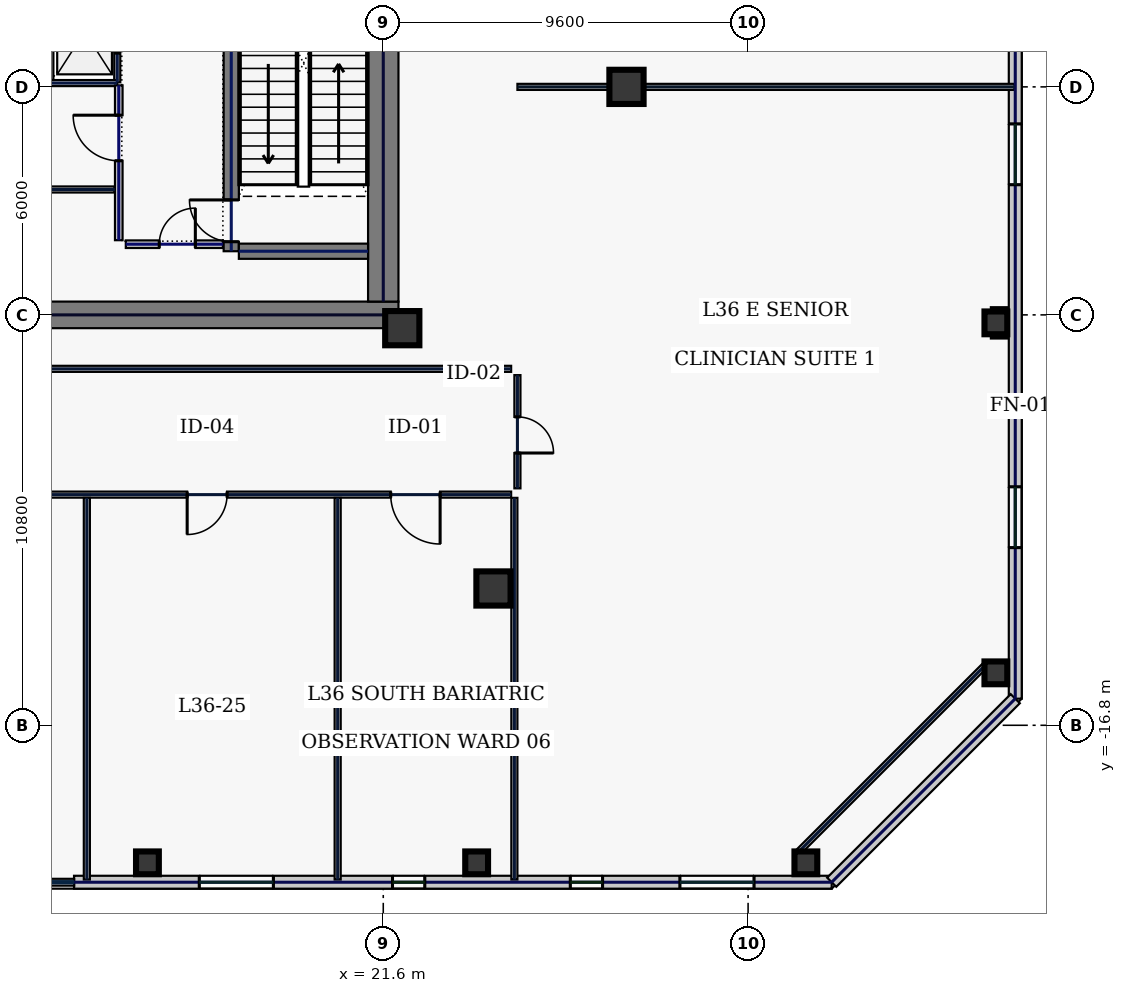
"""IFC4 building model, lengths in metres.
Left out: names, types, materials, properties, quantities, classifications, styles, units other than length and angle.
Written with IfcOpenShell. Run it as: python <this file> out.ifc"""

import sys

from ifc_helpers import new_model, si_unit, direction, frame, frame_2d, origin, origin_2d, place, context, subcontext, project, spatial, rectangle, hollow_rectangle, extrude, element, fill, save


model = new_model("IFC4")
c1 = context("Model", 3, precision=1e-05, world=origin(), true_north=direction((0.0, 1.0)))
c2 = subcontext(c1, "Body", "Model", "MODEL_VIEW")
j1 = project(units=[si_unit("LENGTHUNIT", "METRE"), si_unit("PLANEANGLEUNIT", "RADIAN")], contexts=[c1])
p1 = place(None, origin())
s1 = spatial("IfcSite", under=j1, at=p1, CompositionType="ELEMENT")
p2 = place(p1, origin())
s2 = spatial("IfcBuilding", under=s1, at=p2, CompositionType="ELEMENT")
p3 = place(p2, frame((0.0, 0.0, 160.2)))
s3 = spatial("IfcBuildingStorey", under=s2, at=p3, CompositionType="ELEMENT", Elevation=160.2)
p4 = place(p3, frame((10.45, -6.0, 0.0), z_axis=(0.0, 0.0, 1.0), x_axis=(1.0, 0.0, 0.0)))
e1 = element("IfcWall", 1, at=p4, inside=s3, PredefinedType="SHEAR", context=c2, shape_type="SweptSolid", body=[
    extrude(rectangle(XDim=11.55, YDim=0.7, at=frame_2d((5.775, 0.0))), origin(), (0.0, 0.0, 1.0), 3.74),
])
p5 = place(p3, frame((21.6, -5.65, 0.0), z_axis=(0.0, 0.0, 1.0), x_axis=(0.0, 1.0, 0.0)))
e2 = element("IfcWall", 2, at=p5, inside=s3, PredefinedType="SHEAR", context=c2, shape_type="SweptSolid", body=[
    extrude(rectangle(XDim=11.3, YDim=0.8, at=frame_2d((5.65, 0.0))), origin(), (0.0, 0.0, 1.0), 3.74),
])
p6 = place(p3, frame((17.6, -4.325, 0.0), z_axis=(0.0, 0.0, 1.0), x_axis=(0.0, 1.0, 0.0)))
e3 = element("IfcWall", 3, at=p6, inside=s3, PredefinedType="SHEAR", context=c2, shape_type="SweptSolid", body=[
    extrude(rectangle(XDim=8.65, YDim=0.4, at=frame_2d((4.325, 0.0))), origin(), (0.0, 0.0, 1.0), 3.74),
])
p7 = place(p6, frame((0.25, 0.0, 0.0)))
e4 = element("IfcOpeningElement", 4, at=p7, cuts=e3, PredefinedType="OPENING", context=c2, shape_type="SweptSolid", body=[
    extrude(rectangle(XDim=1.1, YDim=2.2, at=frame_2d((0.55, 1.1))), frame((0.0, 0.21, 0.0), z_axis=(0.0, -1.0, 0.0), x_axis=(1.0, 0.0, 0.0)), (0.0, 0.0, 1.0), 0.42),
])
p8 = place(p3, frame((17.8, -4.325, 0.0), z_axis=(0.0, 0.0, 1.0), x_axis=(1.0, 0.0, 0.0)))
e5 = element("IfcWall", 5, at=p8, inside=s3, PredefinedType="SHEAR", context=c2, shape_type="SweptSolid", body=[
    extrude(rectangle(XDim=3.4, YDim=0.4, at=frame_2d((1.7, 0.0))), origin(), (0.0, 0.0, 1.0), 3.74),
])
for number, where, z_axis, x_axis in (
    (6, (22.1, -6.35, 0.0), (0.0, 0.0, 1.0), (1.0, 0.0, 0.0)),
    (7, (24.5, -13.2, 0.0), (0.0, 0.0, 1.0), (1.0, 0.0, 0.0)),
    (8, (28.0, 0.0, 0.0), (0.0, 0.0, 1.0), (1.0, 0.0, 0.0)),
):
    element("IfcColumn", number, at=place(p3, frame(where, z_axis=z_axis, x_axis=x_axis)), inside=s3, PredefinedType="COLUMN", context=c2, shape_type="SweptSolid", body=[
        extrude(hollow_rectangle(XDim=0.9, YDim=0.9, WallThickness=0.04, at=origin_2d()), origin(), (0.0, 0.0, 1.0), 3.74),
    ])
for number, where, z_axis, x_axis in (
    (9, (15.394, -20.42, 0.0), (0.0, 0.0, 1.0), (1.0, 0.0, 0.0)),
    (10, (24.057, -20.42, 0.0), (0.0, 0.0, 1.0), (1.0, 0.0, 0.0)),
    (11, (32.72, -20.42, 0.0), (0.0, 0.0, 1.0), (1.0, 0.0, 0.0)),
    (12, (37.72, -15.42, 0.0), (0.0, 0.0, 1.0), (1.0, 0.0, 0.0)),
    (13, (37.72, -6.21, 0.0), (0.0, 0.0, 1.0), (1.0, 0.0, 0.0)),
):
    element("IfcColumn", number, at=place(p3, frame(where, z_axis=z_axis, x_axis=x_axis)), inside=s3, PredefinedType="COLUMN", context=c2, shape_type="SweptSolid", body=[
        extrude(hollow_rectangle(XDim=0.6, YDim=0.6, WallThickness=0.028, at=origin_2d()), origin(), (0.0, 0.0, 1.0), 3.74),
    ])
p9 = place(p3, frame((13.463, -20.93, 0.0), z_axis=(0.0, 0.0, 1.0), x_axis=(1.0, 0.0, 0.0)))
e14 = element("IfcWall", 14, at=p9, inside=s3, PredefinedType="STANDARD", context=c2, shape_type="SweptSolid", body=[
    extrude(rectangle(XDim=19.937, YDim=0.34, at=frame_2d((9.969, 0.0))), origin(), (0.0, 0.0, 1.0), 3.74),
])
p10 = place(p9, frame((3.295, 0.0, 0.8)))
e15 = element("IfcOpeningElement", 15, at=p10, cuts=e14, PredefinedType="OPENING", context=c2, shape_type="SweptSolid", body=[
    extrude(rectangle(XDim=1.95, YDim=2.1, at=frame_2d((0.975, 1.05))), frame((0.0, 0.18, 0.0), z_axis=(0.0, -1.0, 0.0), x_axis=(1.0, 0.0, 0.0)), (0.0, 0.0, 1.0), 0.36),
])
p11 = place(p9, frame((8.38, 0.0, 0.8)))
e16 = element("IfcOpeningElement", 16, at=p11, cuts=e14, PredefinedType="OPENING", context=c2, shape_type="SweptSolid", body=[
    extrude(rectangle(XDim=0.85, YDim=1.85, at=frame_2d((0.425, 0.925))), frame((0.0, 0.18, 0.0), z_axis=(0.0, -1.0, 0.0), x_axis=(1.0, 0.0, 0.0)), (0.0, 0.0, 1.0), 0.36),
])
p12 = place(p9, frame((13.058, 0.0, 0.8)))
e17 = element("IfcOpeningElement", 17, at=p12, cuts=e14, PredefinedType="OPENING", context=c2, shape_type="SweptSolid", body=[
    extrude(rectangle(XDim=0.85, YDim=1.85, at=frame_2d((0.425, 0.925))), frame((0.0, 0.18, 0.0), z_axis=(0.0, -1.0, 0.0), x_axis=(1.0, 0.0, 0.0)), (0.0, 0.0, 1.0), 0.36),
])
p13 = place(p9, frame((15.943, 0.0, 0.8)))
e18 = element("IfcOpeningElement", 18, at=p13, cuts=e14, PredefinedType="OPENING", context=c2, shape_type="SweptSolid", body=[
    extrude(rectangle(XDim=1.95, YDim=2.1, at=frame_2d((0.975, 1.05))), frame((0.0, 0.18, 0.0), z_axis=(0.0, -1.0, 0.0), x_axis=(1.0, 0.0, 0.0)), (0.0, 0.0, 1.0), 0.36),
])
p14 = place(p3, frame((38.23, -16.1, 0.0), z_axis=(0.0, 0.0, 1.0), x_axis=(0.0, 1.0, 0.0)))
e19 = element("IfcWall", 19, at=p14, inside=s3, PredefinedType="STANDARD", context=c2, shape_type="SweptSolid", body=[
    extrude(rectangle(XDim=38.2, YDim=0.34, at=frame_2d((19.1, 0.0))), origin(), (0.0, 0.0, 1.0), 3.74),
])
p15 = place(p14, frame((3.975, 0.0, 0.58)))
e20 = element("IfcOpeningElement", 20, at=p15, cuts=e19, PredefinedType="OPENING", context=c2, shape_type="SweptSolid", body=[
    extrude(rectangle(XDim=1.6, YDim=2.3, at=frame_2d((0.8, 1.15))), frame((0.0, 0.18, 0.0), z_axis=(0.0, -1.0, 0.0), x_axis=(1.0, 0.0, 0.0)), (0.0, 0.0, 1.0), 0.36),
])
p16 = place(p14, frame((13.525, 0.0, 0.58)))
e21 = element("IfcOpeningElement", 21, at=p16, cuts=e19, PredefinedType="OPENING", context=c2, shape_type="SweptSolid", body=[
    extrude(rectangle(XDim=1.6, YDim=2.3, at=frame_2d((0.8, 1.15))), frame((0.0, 0.18, 0.0), z_axis=(0.0, -1.0, 0.0), x_axis=(1.0, 0.0, 0.0)), (0.0, 0.0, 1.0), 0.36),
])
p17 = place(p14, frame((23.075, 0.0, 0.58)))
e22 = element("IfcOpeningElement", 22, at=p17, cuts=e19, PredefinedType="OPENING", context=c2, shape_type="SweptSolid", body=[
    extrude(rectangle(XDim=1.6, YDim=2.3, at=frame_2d((0.8, 1.15))), frame((0.0, 0.18, 0.0), z_axis=(0.0, -1.0, 0.0), x_axis=(1.0, 0.0, 0.0)), (0.0, 0.0, 1.0), 0.36),
])
p18 = place(p14, frame((32.625, 0.0, 0.58)))
e23 = element("IfcOpeningElement", 23, at=p18, cuts=e19, PredefinedType="OPENING", context=c2, shape_type="SweptSolid", body=[
    extrude(rectangle(XDim=1.6, YDim=2.3, at=frame_2d((0.8, 1.15))), frame((0.0, 0.18, 0.0), z_axis=(0.0, -1.0, 0.0), x_axis=(1.0, 0.0, 0.0)), (0.0, 0.0, 1.0), 0.36),
])
p19 = place(p3, frame((33.4, -20.93, 0.0), z_axis=(0.0, 0.0, 1.0), x_axis=(0.707124652085, 0.707088909836, 0.0)))
e24 = element("IfcWall", 24, at=p19, inside=s3, PredefinedType="STANDARD", context=c2, shape_type="SweptSolid", body=[
    extrude(rectangle(XDim=6.831, YDim=0.34, at=frame_2d((3.415, 0.0))), origin(), (0.0, 0.0, 1.0), 3.74),
])
p20 = place(p3, frame((14.6, 0.12, 0.0), z_axis=(0.0, 0.0, 1.0), x_axis=(0.0, 1.0, 0.0)))
e25 = element("IfcWall", 25, at=p20, inside=s3, PredefinedType="PARTITIONING", context=c2, shape_type="SweptSolid", body=[
    extrude(rectangle(XDim=2.74, YDim=0.16, at=frame_2d((1.37, 0.0))), origin(), (0.0, 0.0, 1.0), 3.74),
])
p21 = place(p20, frame((0.77, 0.0, 0.0)))
e26 = element("IfcOpeningElement", 26, at=p21, cuts=e25, PredefinedType="OPENING", context=c2, shape_type="SweptSolid", body=[
    extrude(rectangle(XDim=1.2, YDim=2.2, at=frame_2d((0.6, 1.1))), frame((0.0, 0.09, 0.0), z_axis=(0.0, -1.0, 0.0), x_axis=(1.0, 0.0, 0.0)), (0.0, 0.0, 1.0), 0.18),
])
p22 = place(p3, frame((12.84, 0.1, 0.0), z_axis=(0.0, 0.0, 1.0), x_axis=(1.0, 0.0, 0.0)))
e27 = element("IfcWall", 27, at=p22, inside=s3, PredefinedType="PARTITIONING", context=c2, shape_type="SweptSolid", body=[
    extrude(rectangle(XDim=1.76, YDim=0.16, at=frame_2d((0.88, 0.0))), origin(), (0.0, 0.0, 1.0), 3.74),
])
p23 = place(p3, frame((12.84, 0.18, 0.0), z_axis=(0.0, 0.0, 1.0), x_axis=(0.0, 1.0, 0.0)))
e28 = element("IfcWall", 28, at=p23, inside=s3, PredefinedType="PARTITIONING", context=c2, shape_type="SweptSolid", body=[
    extrude(rectangle(XDim=2.62, YDim=0.16, at=frame_2d((1.31, 0.0))), origin(), (0.0, 0.0, 1.0), 3.74),
])
p24 = place(p3, frame((14.825, -4.14, 0.0), z_axis=(0.0, 0.0, 1.0), x_axis=(1.0, 0.0, 0.0)))
e29 = element("IfcWall", 29, at=p24, inside=s3, PredefinedType="SOLIDWALL", context=c2, shape_type="SweptSolid", body=[
    extrude(rectangle(XDim=2.555, YDim=0.2, at=frame_2d((1.277, 0.0))), origin(), (0.0, 0.0, 1.0), 3.74),
])
p25 = place(p24, frame((0.88, 0.0, 0.0)))
e30 = element("IfcOpeningElement", 30, at=p25, cuts=e29, PredefinedType="OPENING", context=c2, shape_type="SweptSolid", body=[
    extrude(rectangle(XDim=0.95, YDim=2.2, at=frame_2d((0.475, 1.1))), frame((0.0, 0.11, 0.0), z_axis=(0.0, -1.0, 0.0), x_axis=(1.0, 0.0, 0.0)), (0.0, 0.0, 1.0), 0.22),
])
p26 = place(p3, frame((12.775, -2.7, 0.0), z_axis=(0.0, 0.0, 1.0), x_axis=(1.0, 0.0, 0.0)))
e31 = element("IfcWall", 31, at=p26, inside=s3, PredefinedType="PARTITIONING", context=c2, shape_type="SweptSolid", body=[
    extrude(rectangle(XDim=1.76, YDim=0.16, at=frame_2d((0.88, 0.0))), origin(), (0.0, 0.0, 1.0), 3.74),
])
p27 = place(p3, frame((14.64, -4.035, 0.0), z_axis=(0.0, 0.0, 1.0), x_axis=(0.0, 1.0, 0.0)))
e32 = element("IfcWall", 32, at=p27, inside=s3, PredefinedType="SOLIDWALL", context=c2, shape_type="SweptSolid", body=[
    extrude(rectangle(XDim=4.075, YDim=0.2, at=frame_2d((2.038, 0.0))), origin(), (0.0, 0.0, 1.0), 3.74),
])
p28 = place(p27, frame((2.09, 0.0, 0.0)))
e33 = element("IfcOpeningElement", 33, at=p28, cuts=e32, PredefinedType="OPENING", context=c2, shape_type="SweptSolid", body=[
    extrude(rectangle(XDim=1.2, YDim=2.2, at=frame_2d((0.6, 1.1))), frame((0.0, 0.11, 0.0), z_axis=(0.0, -1.0, 0.0), x_axis=(1.0, 0.0, 0.0)), (0.0, 0.0, 1.0), 0.22),
])
p29 = place(p3, frame((32.479, -20.18, 0.0), z_axis=(0.0, 0.0, 1.0), x_axis=(0.707106781187, 0.707106781187, 0.0)))
e34 = element("IfcWall", 34, at=p29, inside=s3, PredefinedType="PARTITIONING", context=c2, shape_type="SweptSolid", body=[
    extrude(rectangle(XDim=7.071, YDim=0.16, at=frame_2d((3.536, 0.0))), origin(), (0.0, 0.0, 1.0), 3.74),
])
p30 = place(p3, frame((10.715, -7.42, 0.0), z_axis=(0.0, 0.0, 1.0), x_axis=(1.0, 0.0, 0.0)))
e35 = element("IfcWall", 35, at=p30, inside=s3, PredefinedType="PARTITIONING", context=c2, shape_type="SweptSolid", body=[
    extrude(rectangle(XDim=14.25, YDim=0.16, at=frame_2d((7.125, 0.0))), origin(), (0.0, 0.0, 1.0), 3.74),
])
p31 = place(p3, frame((25.13, -7.585, 0.0), z_axis=(0.0, 0.0, 1.0), x_axis=(0.0, -1.0, 0.0)))
e36 = element("IfcWall", 36, at=p31, inside=s3, PredefinedType="PARTITIONING", context=c2, shape_type="SweptSolid", body=[
    extrude(rectangle(XDim=2.98, YDim=0.16, at=frame_2d((1.49, 0.0))), origin(), (0.0, 0.0, 1.0), 3.74),
])
p32 = place(p31, frame((1.1, 0.0, 0.0)))
e37 = element("IfcOpeningElement", 37, at=p32, cuts=e36, PredefinedType="OPENING", context=c2, shape_type="SweptSolid", body=[
    extrude(rectangle(XDim=0.95, YDim=2.2, at=frame_2d((0.475, 1.1))), frame((0.0, 0.09, 0.0), z_axis=(0.0, -1.0, 0.0), x_axis=(1.0, 0.0, 0.0)), (0.0, 0.0, 1.0), 0.18),
])
p33 = place(p3, frame((24.965, -10.73, 0.0), z_axis=(0.0, 0.0, 1.0), x_axis=(-1.0, 0.0, 0.0)))
e38 = element("IfcWall", 38, at=p33, inside=s3, PredefinedType="PARTITIONING", context=c2, shape_type="SweptSolid", body=[
    extrude(rectangle(XDim=49.93, YDim=0.16, at=frame_2d((24.965, 0.0))), origin(), (0.0, 0.0, 1.0), 3.74),
])
p34 = place(p33, frame((46.931, 0.0, 0.0)))
e39 = element("IfcOpeningElement", 39, at=p34, cuts=e38, PredefinedType="OPENING", context=c2, shape_type="SweptSolid", body=[
    extrude(rectangle(XDim=1.3, YDim=2.2, at=frame_2d((0.65, 1.1))), frame((0.0, 0.09, 0.0), z_axis=(0.0, -1.0, 0.0), x_axis=(1.0, 0.0, 0.0)), (0.0, 0.0, 1.0), 0.18),
])
p35 = place(p33, frame((40.363, 0.0, 0.0)))
e40 = element("IfcOpeningElement", 40, at=p35, cuts=e38, PredefinedType="OPENING", context=c2, shape_type="SweptSolid", body=[
    extrude(rectangle(XDim=1.3, YDim=2.2, at=frame_2d((0.65, 1.1))), frame((0.0, 0.09, 0.0), z_axis=(0.0, -1.0, 0.0), x_axis=(1.0, 0.0, 0.0)), (0.0, 0.0, 1.0), 0.18),
])
p36 = place(p33, frame((32.113, 0.0, 0.0)))
e41 = element("IfcOpeningElement", 41, at=p36, cuts=e38, PredefinedType="OPENING", context=c2, shape_type="SweptSolid", body=[
    extrude(rectangle(XDim=0.95, YDim=2.2, at=frame_2d((0.475, 1.1))), frame((0.0, 0.09, 0.0), z_axis=(0.0, -1.0, 0.0), x_axis=(1.0, 0.0, 0.0)), (0.0, 0.0, 1.0), 0.18),
])
p37 = place(p33, frame((24.55, 0.0, 0.0)))
e42 = element("IfcOpeningElement", 42, at=p37, cuts=e38, PredefinedType="OPENING", context=c2, shape_type="SweptSolid", body=[
    extrude(rectangle(XDim=0.95, YDim=2.2, at=frame_2d((0.475, 1.1))), frame((0.0, 0.09, 0.0), z_axis=(0.0, -1.0, 0.0), x_axis=(1.0, 0.0, 0.0)), (0.0, 0.0, 1.0), 0.18),
])
p38 = place(p33, frame((15.875, 0.0, 0.0)))
e43 = element("IfcOpeningElement", 43, at=p38, cuts=e38, PredefinedType="OPENING", context=c2, shape_type="SweptSolid", body=[
    extrude(rectangle(XDim=0.95, YDim=2.2, at=frame_2d((0.475, 1.1))), frame((0.0, 0.09, 0.0), z_axis=(0.0, -1.0, 0.0), x_axis=(1.0, 0.0, 0.0)), (0.0, 0.0, 1.0), 0.18),
])
p39 = place(p33, frame((7.475, 0.0, 0.0)))
e44 = element("IfcOpeningElement", 44, at=p39, cuts=e38, PredefinedType="OPENING", context=c2, shape_type="SweptSolid", body=[
    extrude(rectangle(XDim=1.05, YDim=2.2, at=frame_2d((0.525, 1.1))), frame((0.0, 0.09, 0.0), z_axis=(0.0, -1.0, 0.0), x_axis=(1.0, 0.0, 0.0)), (0.0, 0.0, 1.0), 0.18),
])
p40 = place(p33, frame((1.869, 0.0, 0.0)))
e45 = element("IfcOpeningElement", 45, at=p40, cuts=e38, PredefinedType="OPENING", context=c2, shape_type="SweptSolid", body=[
    extrude(rectangle(XDim=1.3, YDim=2.2, at=frame_2d((0.65, 1.1))), frame((0.0, 0.09, 0.0), z_axis=(0.0, -1.0, 0.0), x_axis=(1.0, 0.0, 0.0)), (0.0, 0.0, 1.0), 0.18),
])
for number, where, z_axis, x_axis in (
    (46, (25.05, -20.86, 0.0), (0.0, 0.0, 1.0), (0.0, 1.0, 0.0)),
    (47, (13.8, -20.86, 0.0), (0.0, 0.0, 1.0), (0.0, 1.0, 0.0)),
    (48, (20.4, -20.86, 0.0), (0.0, 0.0, 1.0), (0.0, 1.0, 0.0)),
):
    element("IfcWall", number, at=place(p3, frame(where, z_axis=z_axis, x_axis=x_axis)), inside=s3, PredefinedType="PARTITIONING", context=c2, shape_type="SweptSolid", body=[
        extrude(rectangle(XDim=10.045, YDim=0.16, at=frame_2d((5.022, 0.0))), origin(), (0.0, 0.0, 1.0), 3.74),
    ])
p41 = place(p3, frame((25.13, 0.0, 0.0), z_axis=(0.0, 0.0, 1.0), x_axis=(1.0, 0.0, 0.0)))
e49 = element("IfcWall", 49, at=p41, inside=s3, PredefinedType="PARTITIONING", context=c2, shape_type="SweptSolid", body=[
    extrude(rectangle(XDim=13.08, YDim=0.16, at=frame_2d((6.54, 0.0))), origin(), (0.0, 0.0, 1.0), 3.285),
])
p42 = place(p10, origin())
e50 = element("IfcWindow", 50, at=p42, inside=s3, PartitioningType="SINGLE_PANEL", PredefinedType="WINDOW", context=c2, shape_type="SweptSolid", body=[
    extrude(rectangle(XDim=1.95, YDim=2.1, at=frame_2d((0.975, 1.05))), frame((0.0, 0.03, 0.0), z_axis=(0.0, -1.0, 0.0), x_axis=(1.0, 0.0, 0.0)), (0.0, 0.0, 1.0), 0.06),
])
fill(e15, e50)
p43 = place(p11, origin())
e51 = element("IfcWindow", 51, at=p43, inside=s3, PartitioningType="SINGLE_PANEL", PredefinedType="WINDOW", context=c2, shape_type="SweptSolid", body=[
    extrude(rectangle(XDim=0.85, YDim=1.85, at=frame_2d((0.425, 0.925))), frame((0.0, 0.03, 0.0), z_axis=(0.0, -1.0, 0.0), x_axis=(1.0, 0.0, 0.0)), (0.0, 0.0, 1.0), 0.06),
])
fill(e16, e51)
p44 = place(p12, origin())
e52 = element("IfcWindow", 52, at=p44, inside=s3, PartitioningType="SINGLE_PANEL", PredefinedType="WINDOW", context=c2, shape_type="SweptSolid", body=[
    extrude(rectangle(XDim=0.85, YDim=1.85, at=frame_2d((0.425, 0.925))), frame((0.0, 0.03, 0.0), z_axis=(0.0, -1.0, 0.0), x_axis=(1.0, 0.0, 0.0)), (0.0, 0.0, 1.0), 0.06),
])
fill(e17, e52)
p45 = place(p13, origin())
e53 = element("IfcWindow", 53, at=p45, inside=s3, PartitioningType="SINGLE_PANEL", PredefinedType="WINDOW", context=c2, shape_type="SweptSolid", body=[
    extrude(rectangle(XDim=1.95, YDim=2.1, at=frame_2d((0.975, 1.05))), frame((0.0, 0.03, 0.0), z_axis=(0.0, -1.0, 0.0), x_axis=(1.0, 0.0, 0.0)), (0.0, 0.0, 1.0), 0.06),
])
fill(e18, e53)
p46 = place(p15, origin())
e54 = element("IfcWindow", 54, at=p46, inside=s3, PartitioningType="SINGLE_PANEL", PredefinedType="WINDOW", context=c2, shape_type="SweptSolid", body=[
    extrude(rectangle(XDim=1.6, YDim=2.3, at=frame_2d((0.8, 1.15))), frame((0.0, 0.03, 0.0), z_axis=(0.0, -1.0, 0.0), x_axis=(1.0, 0.0, 0.0)), (0.0, 0.0, 1.0), 0.06),
])
fill(e20, e54)
p47 = place(p16, origin())
e55 = element("IfcWindow", 55, at=p47, inside=s3, PartitioningType="SINGLE_PANEL", PredefinedType="WINDOW", context=c2, shape_type="SweptSolid", body=[
    extrude(rectangle(XDim=1.6, YDim=2.3, at=frame_2d((0.8, 1.15))), frame((0.0, 0.03, 0.0), z_axis=(0.0, -1.0, 0.0), x_axis=(1.0, 0.0, 0.0)), (0.0, 0.0, 1.0), 0.06),
])
fill(e21, e55)
p48 = place(p7, origin())
e56 = element("IfcDoor", 56, at=p48, inside=s3, OperationType="SINGLE_SWING_RIGHT", PredefinedType="DOOR", context=c2, shape_type="SweptSolid", body=[
    extrude(rectangle(XDim=1.1, YDim=2.2, at=frame_2d((0.55, 1.1))), frame((0.0, 0.025, 0.0), z_axis=(0.0, -1.0, 0.0), x_axis=(1.0, 0.0, 0.0)), (0.0, 0.0, 1.0), 0.05),
])
fill(e4, e56)
p49 = place(p21, origin())
e57 = element("IfcDoor", 57, at=p49, inside=s3, OperationType="SLIDING_TO_LEFT", PredefinedType="DOOR", context=c2, shape_type="SweptSolid", body=[
    extrude(rectangle(XDim=1.2, YDim=2.2, at=frame_2d((0.6, 1.1))), frame((0.0, 0.025, 0.0), z_axis=(0.0, -1.0, 0.0), x_axis=(1.0, 0.0, 0.0)), (0.0, 0.0, 1.0), 0.05),
])
fill(e26, e57)
p50 = place(p25, origin())
e58 = element("IfcDoor", 58, at=p50, inside=s3, OperationType="SINGLE_SWING_RIGHT", PredefinedType="DOOR", context=c2, shape_type="SweptSolid", body=[
    extrude(rectangle(XDim=0.95, YDim=2.2, at=frame_2d((0.475, 1.1))), frame((0.0, 0.025, 0.0), z_axis=(0.0, -1.0, 0.0), x_axis=(1.0, 0.0, 0.0)), (0.0, 0.0, 1.0), 0.05),
])
fill(e30, e58)
p51 = place(p28, origin())
e59 = element("IfcDoor", 59, at=p51, inside=s3, OperationType="SINGLE_SWING_RIGHT", PredefinedType="DOOR", context=c2, shape_type="SweptSolid", body=[
    extrude(rectangle(XDim=1.2, YDim=2.2, at=frame_2d((0.6, 1.1))), frame((0.0, 0.025, 0.0), z_axis=(0.0, -1.0, 0.0), x_axis=(1.0, 0.0, 0.0)), (0.0, 0.0, 1.0), 0.05),
])
fill(e33, e59)
p52 = place(p39, origin())
e60 = element("IfcDoor", 60, at=p52, inside=s3, OperationType="SINGLE_SWING_RIGHT", PredefinedType="DOOR", context=c2, shape_type="SweptSolid", body=[
    extrude(rectangle(XDim=1.05, YDim=2.2, at=frame_2d((0.525, 1.1))), frame((0.0, 0.025, 0.0), z_axis=(0.0, -1.0, 0.0), x_axis=(1.0, 0.0, 0.0)), (0.0, 0.0, 1.0), 0.05),
])
fill(e44, e60)
p53 = place(p40, origin())
e61 = element("IfcDoor", 61, at=p53, inside=s3, OperationType="SINGLE_SWING_LEFT", PredefinedType="DOOR", context=c2, shape_type="SweptSolid", body=[
    extrude(rectangle(XDim=1.3, YDim=2.2, at=frame_2d((0.65, 1.1))), frame((0.0, 0.025, 0.0), z_axis=(0.0, -1.0, 0.0), x_axis=(1.0, 0.0, 0.0)), (0.0, 0.0, 1.0), 0.05),
])
fill(e45, e61)
p54 = place(p32, origin())
e62 = element("IfcDoor", 62, at=p54, inside=s3, OperationType="SINGLE_SWING_RIGHT", PredefinedType="DOOR", context=c2, shape_type="SweptSolid", body=[
    extrude(rectangle(XDim=0.95, YDim=2.2, at=frame_2d((0.475, 1.1))), frame((0.0, 0.025, 0.0), z_axis=(0.0, -1.0, 0.0), x_axis=(1.0, 0.0, 0.0)), (0.0, 0.0, 1.0), 0.05),
])
fill(e37, e62)
save(model, sys.argv[1])
